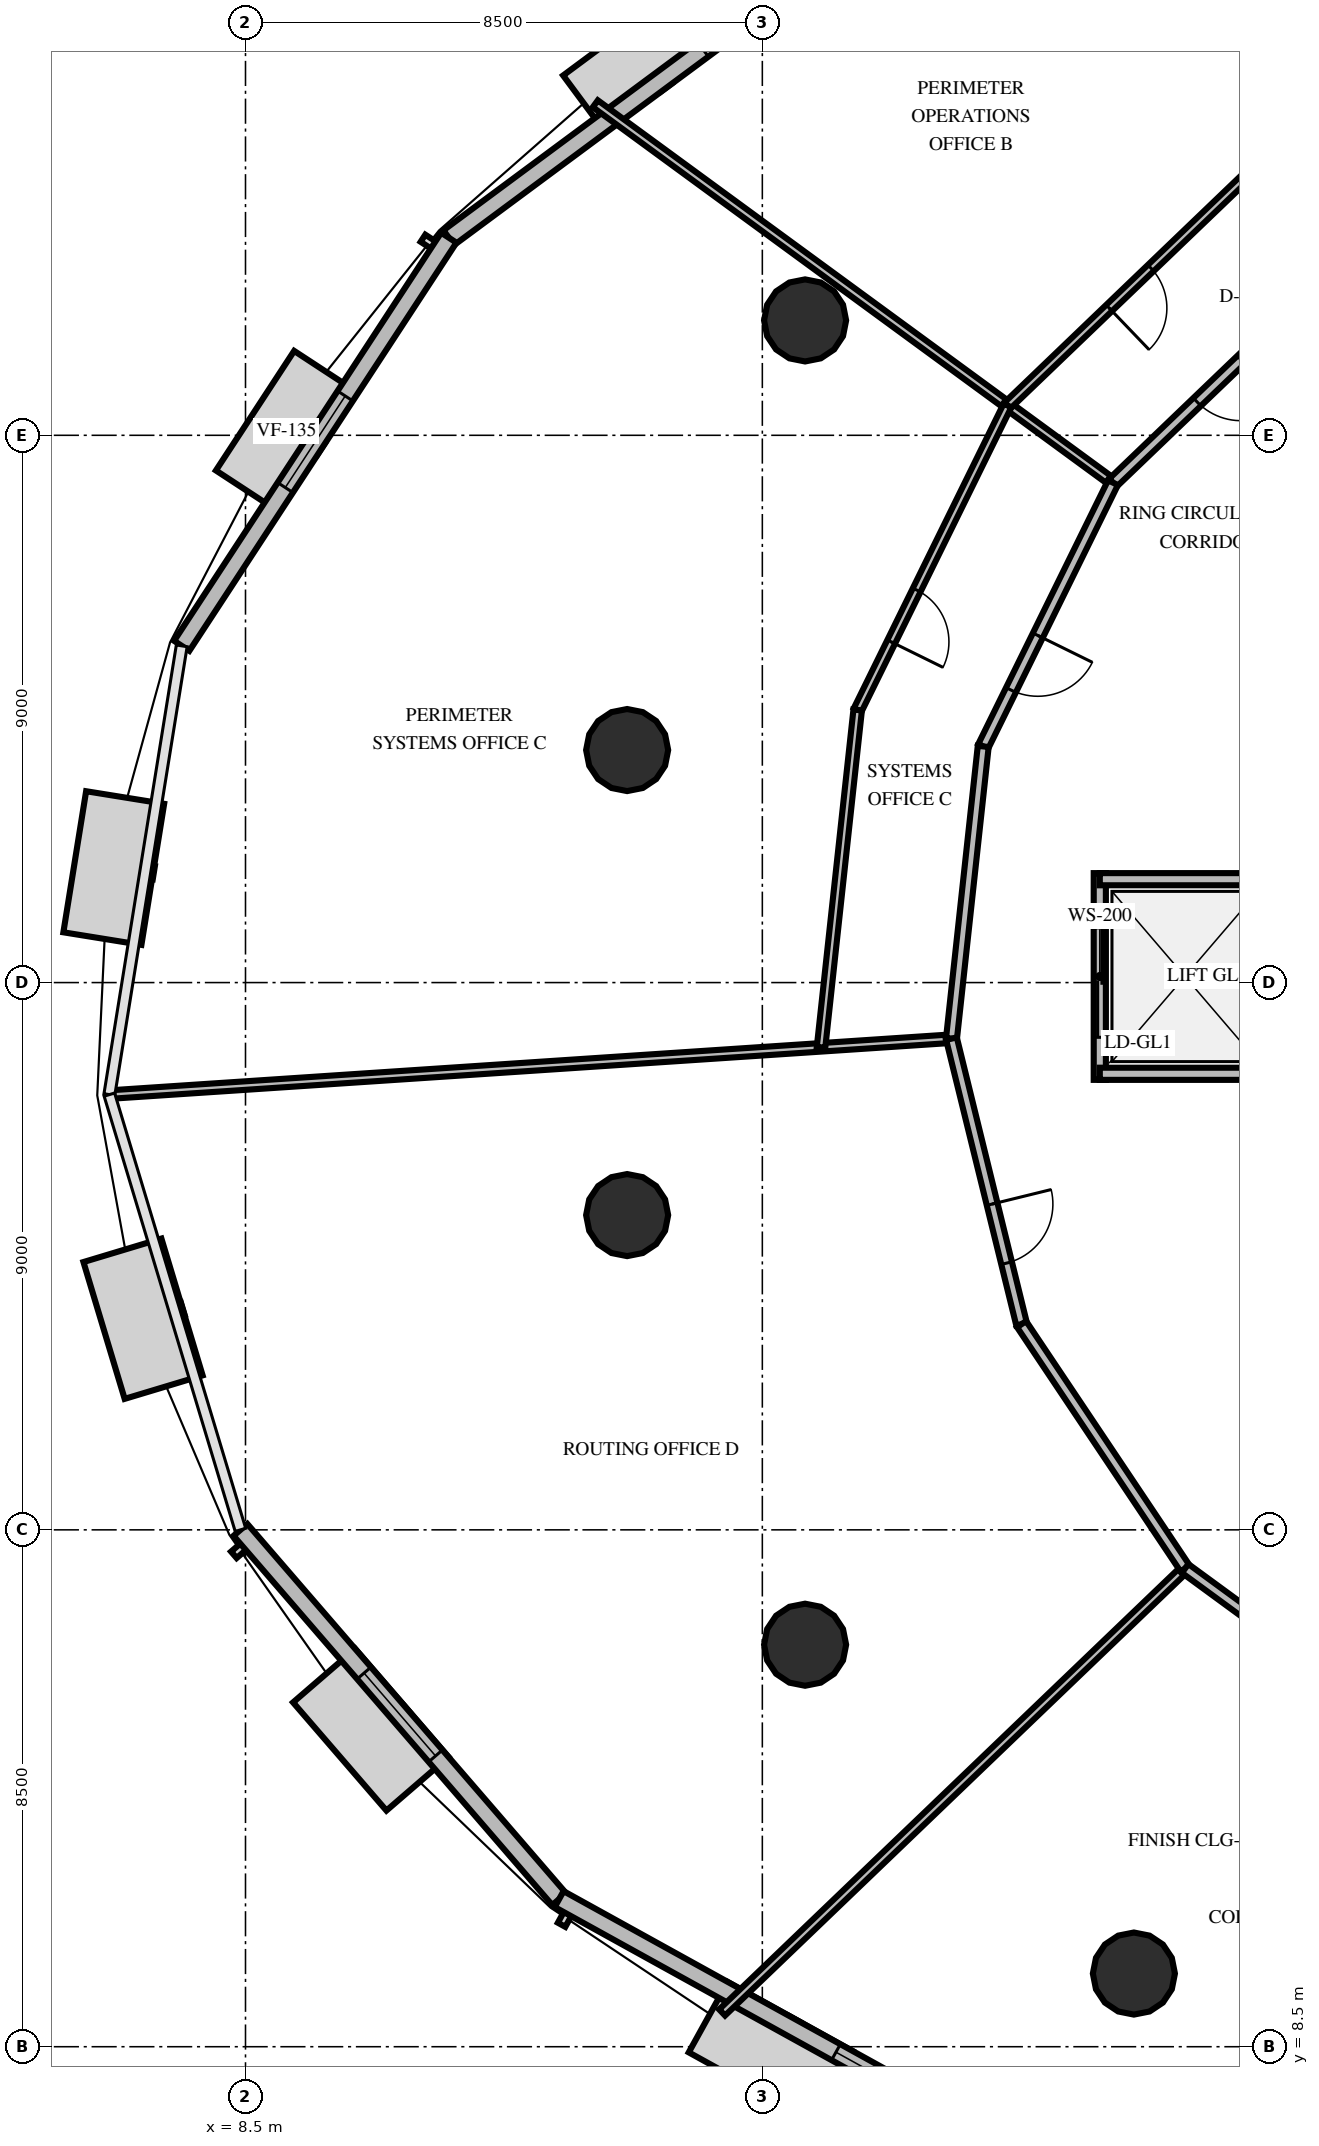
"""IFC4 building model, lengths in metres.
Left out: names, types, materials, properties, quantities, classifications, styles, units other than length and angle.
Written with IfcOpenShell. Run it as: python <this file> out.ifc"""

import sys

from ifc_helpers import new_model, si_unit, direction, frame, frame_2d, origin, origin_2d, place, context, subcontext, project, spatial, rectangle, circle, extrude, element, fill, save


model = new_model("IFC4")
c1 = context("Model", 3, precision=1e-05, world=origin(), true_north=direction((0.0, 1.0)))
c2 = subcontext(c1, "Body", "Model", "MODEL_VIEW")
j1 = project(units=[si_unit("LENGTHUNIT", "METRE"), si_unit("PLANEANGLEUNIT", "RADIAN")], contexts=[c1])
p1 = place(None, origin())
s1 = spatial("IfcSite", under=j1, at=p1, CompositionType="ELEMENT")
p2 = place(p1, origin())
s2 = spatial("IfcBuilding", under=s1, at=p2, CompositionType="ELEMENT")
p3 = place(p2, frame((0.0, 0.0, 46.8)))
s3 = spatial("IfcBuildingStorey", under=s2, at=p3, CompositionType="ELEMENT", Elevation=46.8)
for number, where, z_axis, x_axis in (
    (1, (17.703, 36.889, 0.0), (0.0, 0.0, 1.0), (1.0, 0.0, 0.0)),
    (2, (14.777, 29.824, 0.0), (0.0, 0.0, 1.0), (1.0, 0.0, 0.0)),
    (3, (14.777, 22.176, 0.0), (0.0, 0.0, 1.0), (1.0, 0.0, 0.0)),
    (4, (17.703, 15.111, 0.0), (0.0, 0.0, 1.0), (1.0, 0.0, 0.0)),
    (5, (23.111, 9.703, 0.0), (0.0, 0.0, 1.0), (1.0, 0.0, 0.0)),
):
    element("IfcColumn", number, at=place(p3, frame(where, z_axis=z_axis, x_axis=x_axis)), inside=s3, PredefinedType="COLUMN", context=c2, shape_type="SweptSolid", body=[
        extrude(circle(Radius=0.675, at=origin_2d()), origin(), (0.0, 0.0, 1.0), 4.2),
    ])
p4 = place(p3, frame((18.908, 43.485, 0.0), z_axis=(0.0, 0.0, 1.0), x_axis=(-0.803465201032, -0.595351720187, 0.0)))
e6 = element("IfcWall", 6, at=p4, inside=s3, PredefinedType="SOLIDWALL", context=c2, shape_type="SweptSolid", body=[
    extrude(rectangle(XDim=8.792, YDim=0.3, at=frame_2d((4.396, 0.0))), origin(), (0.0, 0.0, 1.0), 3.0),
])
p5 = place(p4, frame((1.79, 0.0, 0.8)))
e7 = element("IfcOpeningElement", 7, at=p5, cuts=e6, PredefinedType="OPENING", context=c2, shape_type="SweptSolid", body=[
    extrude(rectangle(XDim=1.8, YDim=1.95, at=frame_2d((0.9, 0.975))), frame((0.0, 0.16, 0.0), z_axis=(0.0, -1.0, 0.0), x_axis=(1.0, 0.0, 0.0)), (0.0, 0.0, 1.0), 0.32),
])
p6 = place(p3, frame((11.844, 38.25, 0.0), z_axis=(0.0, 0.0, 1.0), x_axis=(-0.547551088474, -0.836772254267, 0.0)))
e8 = element("IfcWall", 8, at=p6, inside=s3, PredefinedType="SOLIDWALL", context=c2, shape_type="SweptSolid", body=[
    extrude(rectangle(XDim=8.022, YDim=0.3, at=frame_2d((4.011, 0.0))), origin(), (0.0, 0.0, 1.0), 3.0),
])
p7 = place(p6, frame((3.111, 0.0, 0.8)))
e9 = element("IfcOpeningElement", 9, at=p7, cuts=e8, PredefinedType="OPENING", context=c2, shape_type="SweptSolid", body=[
    extrude(rectangle(XDim=1.8, YDim=1.95, at=frame_2d((0.9, 0.975))), frame((0.0, 0.16, 0.0), z_axis=(0.0, -1.0, 0.0), x_axis=(1.0, 0.0, 0.0)), (0.0, 0.0, 1.0), 0.32),
])
p8 = place(p3, frame((8.417, 17.0, 0.0), z_axis=(0.0, 0.0, 1.0), x_axis=(0.653421746462, -0.756994069495, 0.0)))
e10 = element("IfcWall", 10, at=p8, inside=s3, PredefinedType="SOLIDWALL", context=c2, shape_type="SweptSolid", body=[
    extrude(rectangle(XDim=8.021, YDim=0.3, at=frame_2d((4.011, 0.0))), origin(), (0.0, 0.0, 1.0), 3.0),
])
p9 = place(p8, frame((3.111, 0.0, 0.8)))
e11 = element("IfcOpeningElement", 11, at=p9, cuts=e10, PredefinedType="OPENING", context=c2, shape_type="SweptSolid", body=[
    extrude(rectangle(XDim=1.8, YDim=1.95, at=frame_2d((0.9, 0.975))), frame((0.0, 0.16, 0.0), z_axis=(0.0, -1.0, 0.0), x_axis=(1.0, 0.0, 0.0)), (0.0, 0.0, 1.0), 0.32),
])
p10 = place(p3, frame((13.658, 10.927, 0.0), z_axis=(0.0, 0.0, 1.0), x_axis=(0.875145624266, -0.48385962461, 0.0)))
e12 = element("IfcWall", 12, at=p10, inside=s3, PredefinedType="SOLIDWALL", context=c2, shape_type="SweptSolid", body=[
    extrude(rectangle(XDim=8.793, YDim=0.3, at=frame_2d((4.396, 0.0))), origin(), (0.0, 0.0, 1.0), 3.0),
])
p11 = place(p10, frame((5.202, 0.0, 0.8)))
e13 = element("IfcOpeningElement", 13, at=p11, cuts=e12, PredefinedType="OPENING", context=c2, shape_type="SweptSolid", body=[
    extrude(rectangle(XDim=1.8, YDim=1.95, at=frame_2d((0.9, 0.975))), frame((0.0, 0.16, 0.0), z_axis=(0.0, -1.0, 0.0), x_axis=(1.0, 0.0, 0.0)), (0.0, 0.0, 1.0), 0.32),
])
p12 = place(p3, frame((22.55, 24.4, 0.0), z_axis=(0.0, 0.0, 1.0), x_axis=(0.0, 1.0, 0.0)))
e14 = element("IfcWall", 14, at=p12, inside=s3, PredefinedType="SOLIDWALL", context=c2, shape_type="SweptSolid", body=[
    extrude(rectangle(XDim=3.4, YDim=0.2, at=frame_2d((1.7, 0.0))), origin(), (0.0, 0.0, 1.0), 3.0),
])
p13 = place(p12, frame((0.7, 0.0, 0.0)))
e15 = element("IfcOpeningElement", 15, at=p13, cuts=e14, PredefinedType="OPENING", context=c2, shape_type="SweptSolid", body=[
    extrude(rectangle(XDim=1.8, YDim=2.4, at=frame_2d((0.9, 1.2))), frame((0.0, 0.11, 0.0), z_axis=(0.0, -1.0, 0.0), x_axis=(1.0, 0.0, 0.0)), (0.0, 0.0, 1.0), 0.22),
])
for number, where, z_axis, x_axis in (
    (16, (22.55, 24.5, 0.0), (0.0, 0.0, 1.0), (1.0, 0.0, 0.0)),
    (17, (22.55, 27.7, 0.0), (0.0, 0.0, 1.0), (1.0, 0.0, 0.0)),
):
    element("IfcWall", number, at=place(p3, frame(where, z_axis=z_axis, x_axis=x_axis)), inside=s3, PredefinedType="SOLIDWALL", context=c2, shape_type="SweptSolid", body=[
        extrude(rectangle(XDim=2.8, YDim=0.2, at=frame_2d((1.4, 0.0))), origin(), (0.0, 0.0, 1.0), 3.0),
    ])
p14 = place(p3, frame((22.767, 34.221, 0.0), z_axis=(0.0, 0.0, 1.0), x_axis=(-0.806954200192, 0.590614018453, 0.0)))
e18 = element("IfcWall", 18, at=p14, inside=s3, PredefinedType="PARTITIONING", context=c2, shape_type="SweptSolid", body=[
    extrude(rectangle(XDim=10.55, YDim=0.14, at=frame_2d((5.275, 0.0))), origin(), (0.0, 0.0, 1.0), 3.0),
])
p15 = place(p3, frame((26.256, 37.567, 0.0), z_axis=(0.0, 0.0, 1.0), x_axis=(-0.721748503055, -0.692155400425, 0.0)))
e19 = element("IfcWall", 19, at=p15, inside=s3, PredefinedType="PARTITIONING", context=c2, shape_type="SweptSolid", body=[
    extrude(rectangle(XDim=4.834, YDim=0.18, at=frame_2d((2.417, 0.0))), origin(), (0.0, 0.0, 1.0), 3.0),
])
p16 = place(p15, frame((1.917, 0.0, 0.0)))
e20 = element("IfcOpeningElement", 20, at=p16, cuts=e19, PredefinedType="OPENING", context=c2, shape_type="SweptSolid", body=[
    extrude(rectangle(XDim=1.0, YDim=2.15, at=frame_2d((0.5, 1.075))), frame((0.0, 0.1, 0.0), z_axis=(0.0, -1.0, 0.0), x_axis=(1.0, 0.0, 0.0)), (0.0, 0.0, 1.0), 0.2),
])
p17 = place(p3, frame((25.06, 39.354, 0.0), z_axis=(0.0, 0.0, 1.0), x_axis=(-0.721758722744, -0.692144743636, 0.0)))
e21 = element("IfcWall", 21, at=p17, inside=s3, PredefinedType="PARTITIONING", context=c2, shape_type="SweptSolid", body=[
    extrude(rectangle(XDim=5.581, YDim=0.14, at=frame_2d((2.791, 0.0))), origin(), (0.0, 0.0, 1.0), 3.0),
])
p18 = place(p17, frame((2.315, 0.0, 0.0)))
e22 = element("IfcOpeningElement", 22, at=p18, cuts=e21, PredefinedType="OPENING", context=c2, shape_type="SweptSolid", body=[
    extrude(rectangle(XDim=0.95, YDim=2.15, at=frame_2d((0.475, 1.075))), frame((0.0, 0.08, 0.0), z_axis=(0.0, -1.0, 0.0), x_axis=(1.0, 0.0, 0.0)), (0.0, 0.0, 1.0), 0.16),
])
p19 = place(p3, frame((20.111, 25.077, 0.0), z_axis=(0.0, 0.0, 1.0), x_axis=(-0.99780247965, -0.066258671923, 0.0)))
e23 = element("IfcWall", 23, at=p19, inside=s3, PredefinedType="PARTITIONING", context=c2, shape_type="SweptSolid", body=[
    extrude(rectangle(XDim=13.88, YDim=0.14, at=frame_2d((6.94, 0.0))), origin(), (0.0, 0.0, 1.0), 3.0),
])
p20 = place(p3, frame((22.767, 34.221, 0.0), z_axis=(0.0, 0.0, 1.0), x_axis=(-0.44148764498, -0.897267328799, 0.0)))
e24 = element("IfcWall", 24, at=p20, inside=s3, PredefinedType="PARTITIONING", context=c2, shape_type="SweptSolid", body=[
    extrude(rectangle(XDim=4.834, YDim=0.18, at=frame_2d((2.417, 0.0))), origin(), (0.0, 0.0, 1.0), 3.0),
])
p21 = place(p20, frame((2.801, 0.0, 0.0)))
e25 = element("IfcOpeningElement", 25, at=p21, cuts=e24, PredefinedType="OPENING", context=c2, shape_type="SweptSolid", body=[
    extrude(rectangle(XDim=1.0, YDim=2.15, at=frame_2d((0.5, 1.075))), frame((0.0, 0.1, 0.0), z_axis=(0.0, -1.0, 0.0), x_axis=(1.0, 0.0, 0.0)), (0.0, 0.0, 1.0), 0.2),
])
p22 = place(p3, frame((20.633, 29.884, 0.0), z_axis=(0.0, 0.0, 1.0), x_axis=(-0.108020120209, -0.994148708006, 0.0)))
e26 = element("IfcWall", 26, at=p22, inside=s3, PredefinedType="PARTITIONING", context=c2, shape_type="SweptSolid", body=[
    extrude(rectangle(XDim=4.834, YDim=0.18, at=frame_2d((2.417, 0.0))), origin(), (0.0, 0.0, 1.0), 3.0),
])
p23 = place(p3, frame((21.032, 35.491, 0.0), z_axis=(0.0, 0.0, 1.0), x_axis=(-0.441482494999, -0.897269862756, 0.0)))
e27 = element("IfcWall", 27, at=p23, inside=s3, PredefinedType="PARTITIONING", context=c2, shape_type="SweptSolid", body=[
    extrude(rectangle(XDim=5.581, YDim=0.14, at=frame_2d((2.791, 0.0))), origin(), (0.0, 0.0, 1.0), 3.0),
])
p24 = place(p23, frame((3.383, 0.0, 0.0)))
e28 = element("IfcOpeningElement", 28, at=p24, cuts=e27, PredefinedType="OPENING", context=c2, shape_type="SweptSolid", body=[
    extrude(rectangle(XDim=0.95, YDim=2.15, at=frame_2d((0.475, 1.075))), frame((0.0, 0.08, 0.0), z_axis=(0.0, -1.0, 0.0), x_axis=(1.0, 0.0, 0.0)), (0.0, 0.0, 1.0), 0.16),
])
p25 = place(p3, frame((18.568, 30.483, 0.0), z_axis=(0.0, 0.0, 1.0), x_axis=(-0.10800654761, -0.994150182655, 0.0)))
e29 = element("IfcWall", 29, at=p25, inside=s3, PredefinedType="PARTITIONING", context=c2, shape_type="SweptSolid", body=[
    extrude(rectangle(XDim=5.581, YDim=0.14, at=frame_2d((2.791, 0.0))), origin(), (0.0, 0.0, 1.0), 3.0),
])
p26 = place(p3, frame((23.953, 16.365, 0.0), z_axis=(0.0, 0.0, 1.0), x_axis=(-0.721750224286, -0.692153605599, 0.0)))
e30 = element("IfcWall", 30, at=p26, inside=s3, PredefinedType="PARTITIONING", context=c2, shape_type="SweptSolid", body=[
    extrude(rectangle(XDim=10.55, YDim=0.14, at=frame_2d((5.275, 0.0))), origin(), (0.0, 0.0, 1.0), 3.0),
])
p27 = place(p3, frame((20.111, 25.077, 0.0), z_axis=(0.0, 0.0, 1.0), x_axis=(0.23856484239, -0.971126570523, 0.0)))
e31 = element("IfcWall", 31, at=p27, inside=s3, PredefinedType="PARTITIONING", context=c2, shape_type="SweptSolid", body=[
    extrude(rectangle(XDim=4.834, YDim=0.18, at=frame_2d((2.417, 0.0))), origin(), (0.0, 0.0, 1.0), 3.0),
])
p28 = place(p27, frame((2.801, 0.0, 0.0)))
e32 = element("IfcOpeningElement", 32, at=p28, cuts=e31, PredefinedType="OPENING", context=c2, shape_type="SweptSolid", body=[
    extrude(rectangle(XDim=1.0, YDim=2.15, at=frame_2d((0.5, 1.075))), frame((0.0, 0.1, 0.0), z_axis=(0.0, -1.0, 0.0), x_axis=(1.0, 0.0, 0.0)), (0.0, 0.0, 1.0), 0.2),
])
p29 = place(p3, frame((21.264, 20.383, 0.0), z_axis=(0.0, 0.0, 1.0), x_axis=(0.556295861918, -0.830984304312, 0.0)))
e33 = element("IfcWall", 33, at=p29, inside=s3, PredefinedType="PARTITIONING", context=c2, shape_type="SweptSolid", body=[
    extrude(rectangle(XDim=4.834, YDim=0.18, at=frame_2d((2.417, 0.0))), origin(), (0.0, 0.0, 1.0), 3.0),
])
p30 = place(p3, frame((23.953, 16.365, 0.0), z_axis=(0.0, 0.0, 1.0), x_axis=(0.806956945118, -0.590610268049, 0.0)))
e34 = element("IfcWall", 34, at=p30, inside=s3, PredefinedType="PARTITIONING", context=c2, shape_type="SweptSolid", body=[
    extrude(rectangle(XDim=4.834, YDim=0.18, at=frame_2d((2.417, 0.0))), origin(), (0.0, 0.0, 1.0), 3.0),
])
p31 = place(p7, origin())
e35 = element("IfcWindow", 35, at=p31, inside=s3, PartitioningType="SINGLE_PANEL", PredefinedType="WINDOW", context=c2, shape_type="SweptSolid", body=[
    extrude(rectangle(XDim=1.8, YDim=1.95, at=frame_2d((0.9, 0.975))), frame((0.0, 0.03, 0.0), z_axis=(0.0, -1.0, 0.0), x_axis=(1.0, 0.0, 0.0)), (0.0, 0.0, 1.0), 0.06),
])
fill(e9, e35)
p32 = place(p9, origin())
e36 = element("IfcWindow", 36, at=p32, inside=s3, PartitioningType="SINGLE_PANEL", PredefinedType="WINDOW", context=c2, shape_type="SweptSolid", body=[
    extrude(rectangle(XDim=1.8, YDim=1.95, at=frame_2d((0.9, 0.975))), frame((0.0, 0.03, 0.0), z_axis=(0.0, -1.0, 0.0), x_axis=(1.0, 0.0, 0.0)), (0.0, 0.0, 1.0), 0.06),
])
fill(e11, e36)
p33 = place(p11, origin())
e37 = element("IfcWindow", 37, at=p33, inside=s3, PartitioningType="SINGLE_PANEL", PredefinedType="WINDOW", context=c2, shape_type="SweptSolid", body=[
    extrude(rectangle(XDim=1.8, YDim=1.95, at=frame_2d((0.9, 0.975))), frame((0.0, 0.03, 0.0), z_axis=(0.0, -1.0, 0.0), x_axis=(1.0, 0.0, 0.0)), (0.0, 0.0, 1.0), 0.06),
])
fill(e13, e37)
p34 = place(p13, origin())
e38 = element("IfcDoor", 38, at=p34, inside=s3, OperationType="DOUBLE_DOOR_SLIDING", PredefinedType="USERDEFINED", context=c2, shape_type="SweptSolid", body=[
    extrude(rectangle(XDim=1.8, YDim=2.4, at=frame_2d((0.9, 1.2))), frame((0.0, 0.025, 0.0), z_axis=(0.0, -1.0, 0.0), x_axis=(1.0, 0.0, 0.0)), (0.0, 0.0, 1.0), 0.05),
])
fill(e15, e38)
p35 = place(p16, origin())
e39 = element("IfcDoor", 39, at=p35, inside=s3, OperationType="SINGLE_SWING_LEFT", PredefinedType="DOOR", context=c2, shape_type="SweptSolid", body=[
    extrude(rectangle(XDim=1.0, YDim=2.15, at=frame_2d((0.5, 1.075))), frame((0.0, 0.025, 0.0), z_axis=(0.0, -1.0, 0.0), x_axis=(1.0, 0.0, 0.0)), (0.0, 0.0, 1.0), 0.05),
])
fill(e20, e39)
p36 = place(p18, origin())
e40 = element("IfcDoor", 40, at=p36, inside=s3, OperationType="SINGLE_SWING_RIGHT", PredefinedType="DOOR", context=c2, shape_type="SweptSolid", body=[
    extrude(rectangle(XDim=0.95, YDim=2.15, at=frame_2d((0.475, 1.075))), frame((0.0, 0.025, 0.0), z_axis=(0.0, -1.0, 0.0), x_axis=(1.0, 0.0, 0.0)), (0.0, 0.0, 1.0), 0.05),
])
fill(e22, e40)
p37 = place(p21, origin())
e41 = element("IfcDoor", 41, at=p37, inside=s3, OperationType="SINGLE_SWING_LEFT", PredefinedType="DOOR", context=c2, shape_type="SweptSolid", body=[
    extrude(rectangle(XDim=1.0, YDim=2.15, at=frame_2d((0.5, 1.075))), frame((0.0, 0.025, 0.0), z_axis=(0.0, -1.0, 0.0), x_axis=(1.0, 0.0, 0.0)), (0.0, 0.0, 1.0), 0.05),
])
fill(e25, e41)
p38 = place(p24, origin())
e42 = element("IfcDoor", 42, at=p38, inside=s3, OperationType="SINGLE_SWING_RIGHT", PredefinedType="DOOR", context=c2, shape_type="SweptSolid", body=[
    extrude(rectangle(XDim=0.95, YDim=2.15, at=frame_2d((0.475, 1.075))), frame((0.0, 0.025, 0.0), z_axis=(0.0, -1.0, 0.0), x_axis=(1.0, 0.0, 0.0)), (0.0, 0.0, 1.0), 0.05),
])
fill(e28, e42)
p39 = place(p28, origin())
e43 = element("IfcDoor", 43, at=p39, inside=s3, OperationType="SINGLE_SWING_LEFT", PredefinedType="DOOR", context=c2, shape_type="SweptSolid", body=[
    extrude(rectangle(XDim=1.0, YDim=2.15, at=frame_2d((0.5, 1.075))), frame((0.0, 0.025, 0.0), z_axis=(0.0, -1.0, 0.0), x_axis=(1.0, 0.0, 0.0)), (0.0, 0.0, 1.0), 0.05),
])
fill(e32, e43)
save(model, sys.argv[1])
